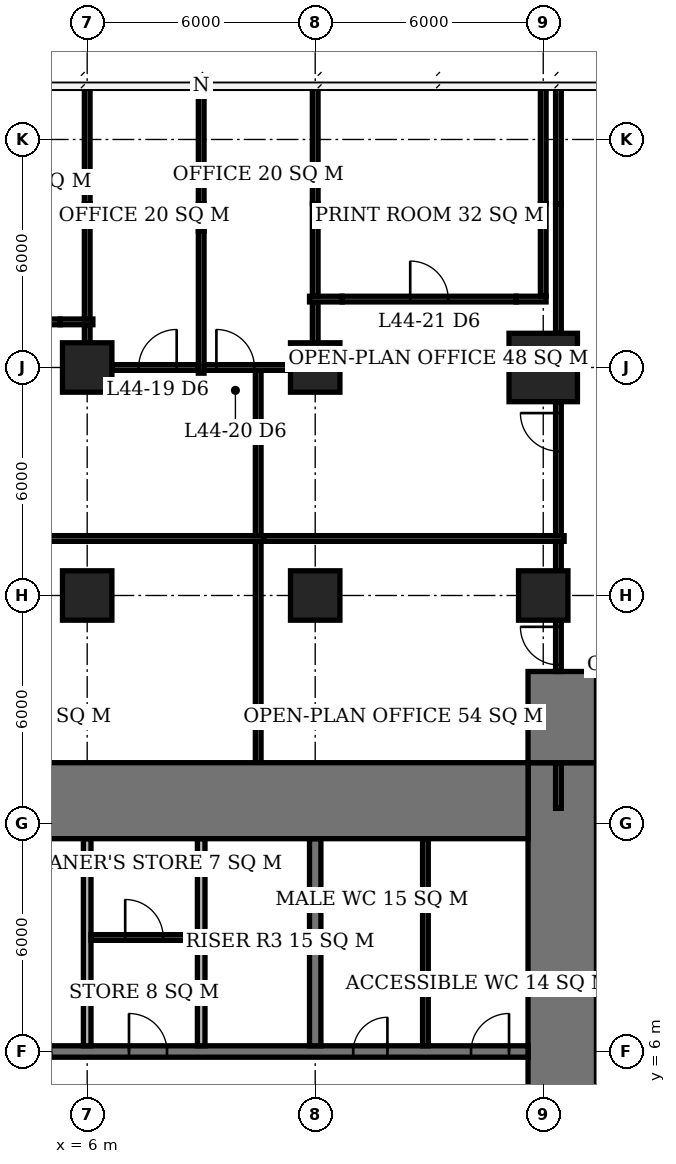
"""IFC4 building model, lengths in metres.
Left out: names, types, materials, properties, quantities, classifications, styles, units other than length and angle.
Written with IfcOpenShell. Run it as: python <this file> out.ifc"""

import sys

from ifc_helpers import new_model, si_unit, direction, frame, frame_2d, origin, origin_2d, place, context, subcontext, project, spatial, rectangle, extrude, element, fill, save


model = new_model("IFC4")
c1 = context("Model", 3, precision=1e-05, world=origin(), true_north=direction((0.0, 1.0)))
c2 = subcontext(c1, "Body", "Model", "MODEL_VIEW")
j1 = project(units=[si_unit("LENGTHUNIT", "METRE"), si_unit("PLANEANGLEUNIT", "RADIAN")], contexts=[c1])
p1 = place(None, origin())
s1 = spatial("IfcSite", under=j1, at=p1, CompositionType="ELEMENT")
p2 = place(p1, origin())
s2 = spatial("IfcBuilding", under=s1, at=p2, CompositionType="ELEMENT")
p3 = place(p2, frame((0.0, 0.0, 181.1)))
s3 = spatial("IfcBuildingStorey", under=s2, at=p3, CompositionType="ELEMENT", Elevation=181.1)
for number, where, z_axis, x_axis in (
    (1, (6.0, 18.0, 0.0), (0.0, 0.0, 1.0), (1.0, 0.0, 0.0)),
    (2, (6.0, 24.0, 0.0), (0.0, 0.0, 1.0), (1.0, 0.0, 0.0)),
    (3, (12.0, 18.0, 0.0), (0.0, 0.0, 1.0), (1.0, 0.0, 0.0)),
    (4, (12.0, 24.0, 0.0), (0.0, 0.0, 1.0), (1.0, 0.0, 0.0)),
    (5, (18.0, 18.0, 0.0), (0.0, 0.0, 1.0), (1.0, 0.0, 0.0)),
):
    element("IfcColumn", number, at=place(p3, frame(where, z_axis=z_axis, x_axis=x_axis)), inside=s3, PredefinedType="COLUMN", context=c2, shape_type="SweptSolid", body=[
        extrude(rectangle(XDim=1.3, YDim=1.3, at=origin_2d()), origin(), (0.0, 0.0, 1.0), 3.9),
    ])
p4 = place(p3, frame((18.0, 24.0, 0.0), z_axis=(0.0, 0.0, 1.0), x_axis=(1.0, 0.0, 0.0)))
e6 = element("IfcColumn", 6, at=p4, inside=s3, PredefinedType="COLUMN", context=c2, shape_type="SweptSolid", body=[
    extrude(rectangle(XDim=1.8, YDim=1.8, at=origin_2d()), origin(), (0.0, 0.0, 1.0), 3.9),
])
p5 = place(p3, frame((-5.6, 12.6, 0.0), z_axis=(0.0, 0.0, 1.0), x_axis=(1.0, 0.0, 0.0)))
e7 = element("IfcWall", 7, at=p5, inside=s3, PredefinedType="SHEAR", context=c2, shape_type="SweptSolid", body=[
    extrude(rectangle(XDim=23.2, YDim=2.0, at=frame_2d((11.6, 0.0))), origin(), (0.0, 0.0, 1.0), 3.9),
])
p6 = place(p3, frame((18.5, -7.6, 0.0), z_axis=(0.0, 0.0, 1.0), x_axis=(0.0, 1.0, 0.0)))
e8 = element("IfcWall", 8, at=p6, inside=s3, PredefinedType="SHEAR", context=c2, shape_type="SweptSolid", body=[
    extrude(rectangle(XDim=21.2, YDim=1.8, at=frame_2d((10.6, 0.0))), origin(), (0.0, 0.0, 1.0), 3.9),
])
p7 = place(p6, frame((9.2, 0.0, 0.0)))
e9 = element("IfcOpeningElement", 9, at=p7, cuts=e8, PredefinedType="OPENING", context=c2, shape_type="SweptSolid", body=[
    extrude(rectangle(XDim=1.8, YDim=2.4, at=frame_2d((0.9, 1.2))), frame((0.0, 0.91, 0.0), z_axis=(0.0, -1.0, 0.0), x_axis=(1.0, 0.0, 0.0)), (0.0, 0.0, 1.0), 1.82),
])
p8 = place(p3, frame((18.5, 13.6, 0.0), z_axis=(0.0, 0.0, 1.0), x_axis=(0.0, 1.0, 0.0)))
e10 = element("IfcWall", 10, at=p8, inside=s3, PredefinedType="SHEAR", context=c2, shape_type="SweptSolid", body=[
    extrude(rectangle(XDim=2.4, YDim=1.8, at=frame_2d((1.2, 0.0))), origin(), (0.0, 0.0, 1.0), 3.9),
])
p9 = place(p3, frame((-0.15, 6.0, 0.0), z_axis=(0.0, 0.0, 1.0), x_axis=(1.0, 0.0, 0.0)))
e11 = element("IfcWall", 11, at=p9, inside=s3, PredefinedType="SHEAR", context=c2, shape_type="SweptSolid", body=[
    extrude(rectangle(XDim=17.75, YDim=0.3, at=frame_2d((8.875, 0.0))), origin(), (0.0, 0.0, 1.0), 3.9),
])
p10 = place(p9, frame((13.15, 0.0, 0.0)))
e12 = element("IfcOpeningElement", 12, at=p10, cuts=e11, PredefinedType="OPENING", context=c2, shape_type="SweptSolid", body=[
    extrude(rectangle(XDim=0.9, YDim=2.1, at=frame_2d((0.45, 1.05))), frame((0.0, 0.16, 0.0), z_axis=(0.0, -1.0, 0.0), x_axis=(1.0, 0.0, 0.0)), (0.0, 0.0, 1.0), 0.32),
])
p11 = place(p9, frame((16.25, 0.0, 0.0)))
e13 = element("IfcOpeningElement", 13, at=p11, cuts=e11, PredefinedType="OPENING", context=c2, shape_type="SweptSolid", body=[
    extrude(rectangle(XDim=1.0, YDim=2.1, at=frame_2d((0.5, 1.05))), frame((0.0, 0.16, 0.0), z_axis=(0.0, -1.0, 0.0), x_axis=(1.0, 0.0, 0.0)), (0.0, 0.0, 1.0), 0.32),
])
p12 = place(p9, frame((7.25, 0.0, 0.0)))
e14 = element("IfcOpeningElement", 14, at=p12, cuts=e11, PredefinedType="OPENING", context=c2, shape_type="SweptSolid", body=[
    extrude(rectangle(XDim=1.0, YDim=2.1, at=frame_2d((0.5, 1.05))), frame((0.0, 0.16, 0.0), z_axis=(0.0, -1.0, 0.0), x_axis=(1.0, 0.0, 0.0)), (0.0, 0.0, 1.0), 0.32),
])
p13 = place(p9, frame((1.1, 0.0, 0.0)))
e15 = element("IfcOpeningElement", 15, at=p13, cuts=e11, PredefinedType="OPENING", context=c2, shape_type="SweptSolid", body=[
    extrude(rectangle(XDim=1.1, YDim=2.1, at=frame_2d((0.55, 1.05))), frame((0.0, 0.16, 0.0), z_axis=(0.0, -1.0, 0.0), x_axis=(1.0, 0.0, 0.0)), (0.0, 0.0, 1.0), 0.32),
])
p14 = place(p9, frame((4.1, 0.0, 0.0)))
e16 = element("IfcOpeningElement", 16, at=p14, cuts=e11, PredefinedType="OPENING", context=c2, shape_type="SweptSolid", body=[
    extrude(rectangle(XDim=1.1, YDim=2.1, at=frame_2d((0.55, 1.05))), frame((0.0, 0.16, 0.0), z_axis=(0.0, -1.0, 0.0), x_axis=(1.0, 0.0, 0.0)), (0.0, 0.0, 1.0), 0.32),
])
p15 = place(p3, frame((12.0, 6.15, 0.0), z_axis=(0.0, 0.0, 1.0), x_axis=(0.0, 1.0, 0.0)))
e17 = element("IfcWall", 17, at=p15, inside=s3, PredefinedType="SHEAR", context=c2, shape_type="SweptSolid", body=[
    extrude(rectangle(XDim=5.45, YDim=0.3, at=frame_2d((2.725, 0.0))), origin(), (0.0, 0.0, 1.0), 3.9),
])
for number, where, z_axis, x_axis in (
    (18, (6.0, 6.15, 0.0), (0.0, 0.0, 1.0), (0.0, 1.0, 0.0)),
    (19, (9.0, 6.15, 0.0), (0.0, 0.0, 1.0), (0.0, 1.0, 0.0)),
):
    element("IfcWall", number, at=place(p3, frame(where, z_axis=z_axis, x_axis=x_axis)), inside=s3, PredefinedType="SOLIDWALL", context=c2, shape_type="SweptSolid", body=[
        extrude(rectangle(XDim=5.45, YDim=0.2, at=frame_2d((2.725, 0.0))), origin(), (0.0, 0.0, 1.0), 3.9),
    ])
p16 = place(p3, frame((14.9, 6.15, 0.0), z_axis=(0.0, 0.0, 1.0), x_axis=(0.0, 1.0, 0.0)))
e20 = element("IfcWall", 20, at=p16, inside=s3, PredefinedType="PLUMBINGWALL", context=c2, shape_type="SweptSolid", body=[
    extrude(rectangle(XDim=5.45, YDim=0.15, at=frame_2d((2.725, 0.0))), origin(), (0.0, 0.0, 1.0), 3.65),
])
p17 = place(p3, frame((6.1, 9.0, 0.0), z_axis=(0.0, 0.0, 1.0), x_axis=(1.0, 0.0, 0.0)))
e21 = element("IfcWall", 21, at=p17, inside=s3, PredefinedType="PARTITIONING", context=c2, shape_type="SweptSolid", body=[
    extrude(rectangle(XDim=2.8, YDim=0.15, at=frame_2d((1.4, 0.0))), origin(), (0.0, 0.0, 1.0), 3.65),
])
p18 = place(p17, frame((0.9, 0.0, 0.0)))
e22 = element("IfcOpeningElement", 22, at=p18, cuts=e21, PredefinedType="OPENING", context=c2, shape_type="SweptSolid", body=[
    extrude(rectangle(XDim=1.0, YDim=2.1, at=frame_2d((0.5, 1.05))), frame((0.0, 0.085, 0.0), z_axis=(0.0, -1.0, 0.0), x_axis=(1.0, 0.0, 0.0)), (0.0, 0.0, 1.0), 0.17),
])
p19 = place(p3, frame((6.66, 24.0, 0.0), z_axis=(0.0, 0.0, 1.0), x_axis=(1.0, 0.0, 0.0)))
e23 = element("IfcWall", 23, at=p19, inside=s3, PredefinedType="PARTITIONING", context=c2, shape_type="SweptSolid", body=[
    extrude(rectangle(XDim=2.265, YDim=0.15, at=frame_2d((1.133, 0.0))), origin(), (0.0, 0.0, 1.0), 3.65),
])
p20 = place(p19, frame((0.695, 0.0, 0.0)))
e24 = element("IfcOpeningElement", 24, at=p20, cuts=e23, PredefinedType="OPENING", context=c2, shape_type="SweptSolid", body=[
    extrude(rectangle(XDim=1.0, YDim=2.1, at=frame_2d((0.5, 1.05))), frame((0.0, 0.085, 0.0), z_axis=(0.0, -1.0, 0.0), x_axis=(1.0, 0.0, 0.0)), (0.0, 0.0, 1.0), 0.17),
])
p21 = place(p3, frame((9.075, 24.0, 0.0), z_axis=(0.0, 0.0, 1.0), x_axis=(1.0, 0.0, 0.0)))
e25 = element("IfcWall", 25, at=p21, inside=s3, PredefinedType="PARTITIONING", context=c2, shape_type="SweptSolid", body=[
    extrude(rectangle(XDim=2.265, YDim=0.15, at=frame_2d((1.133, 0.0))), origin(), (0.0, 0.0, 1.0), 3.65),
])
p22 = place(p21, frame((0.325, 0.0, 0.0)))
e26 = element("IfcOpeningElement", 26, at=p22, cuts=e25, PredefinedType="OPENING", context=c2, shape_type="SweptSolid", body=[
    extrude(rectangle(XDim=1.0, YDim=2.1, at=frame_2d((0.5, 1.05))), frame((0.0, 0.085, 0.0), z_axis=(0.0, -1.0, 0.0), x_axis=(1.0, 0.0, 0.0)), (0.0, 0.0, 1.0), 0.17),
])
p23 = place(p3, frame((0.71, 25.2, 0.0), z_axis=(0.0, 0.0, 1.0), x_axis=(1.0, 0.0, 0.0)))
e27 = element("IfcWall", 27, at=p23, inside=s3, PredefinedType="PARTITIONING", context=c2, shape_type="SweptSolid", body=[
    extrude(rectangle(XDim=4.58, YDim=0.15, at=frame_2d((2.29, 0.0))), origin(), (0.0, 0.0, 1.0), 3.65),
])
p24 = place(p23, frame((1.79, 0.0, 0.0)))
e28 = element("IfcOpeningElement", 28, at=p24, cuts=e27, PredefinedType="OPENING", context=c2, shape_type="SweptSolid", body=[
    extrude(rectangle(XDim=1.0, YDim=2.1, at=frame_2d((0.5, 1.05))), frame((0.0, 0.085, 0.0), z_axis=(0.0, -1.0, 0.0), x_axis=(1.0, 0.0, 0.0)), (0.0, 0.0, 1.0), 0.17),
])
for number, where, z_axis, x_axis in (
    (29, (5.29, 25.2, 0.0), (0.0, 0.0, 1.0), (1.0, 0.0, 0.0)),
    (30, (11.85, 25.8, 0.0), (0.0, 0.0, 1.0), (1.0, 0.0, 0.0)),
):
    element("IfcWall", number, at=place(p3, frame(where, z_axis=z_axis, x_axis=x_axis)), inside=s3, PredefinedType="PARTITIONING", context=c2, shape_type="SweptSolid", body=[
        extrude(rectangle(XDim=0.86, YDim=0.15, at=frame_2d((0.43, 0.0))), origin(), (0.0, 0.0, 1.0), 2.65),
    ])
p25 = place(p3, frame((12.71, 25.8, 0.0), z_axis=(0.0, 0.0, 1.0), x_axis=(1.0, 0.0, 0.0)))
e31 = element("IfcWall", 31, at=p25, inside=s3, PredefinedType="PARTITIONING", context=c2, shape_type="SweptSolid", body=[
    extrude(rectangle(XDim=4.58, YDim=0.15, at=frame_2d((2.29, 0.0))), origin(), (0.0, 0.0, 1.0), 3.65),
])
p26 = place(p25, frame((1.79, 0.0, 0.0)))
e32 = element("IfcOpeningElement", 32, at=p26, cuts=e31, PredefinedType="OPENING", context=c2, shape_type="SweptSolid", body=[
    extrude(rectangle(XDim=1.0, YDim=2.1, at=frame_2d((0.5, 1.05))), frame((0.0, 0.085, 0.0), z_axis=(0.0, -1.0, 0.0), x_axis=(1.0, 0.0, 0.0)), (0.0, 0.0, 1.0), 0.17),
])
p27 = place(p3, frame((17.29, 25.8, 0.0), z_axis=(0.0, 0.0, 1.0), x_axis=(1.0, 0.0, 0.0)))
e33 = element("IfcWall", 33, at=p27, inside=s3, PredefinedType="PARTITIONING", context=c2, shape_type="SweptSolid", body=[
    extrude(rectangle(XDim=0.785, YDim=0.15, at=frame_2d((0.393, 0.0))), origin(), (0.0, 0.0, 1.0), 2.65),
])
p28 = place(p3, frame((6.0, 24.65, 0.0), z_axis=(0.0, 0.0, 1.0), x_axis=(0.0, 1.0, 0.0)))
e34 = element("IfcWall", 34, at=p28, inside=s3, PredefinedType="PARTITIONING", context=c2, shape_type="SweptSolid", body=[
    extrude(rectangle(XDim=0.475, YDim=0.15, at=frame_2d((0.238, 0.0))), origin(), (0.0, 0.0, 1.0), 2.65),
])
p29 = place(p3, frame((6.0, 25.275, 0.0), z_axis=(0.0, 0.0, 1.0), x_axis=(0.0, 1.0, 0.0)))
e35 = element("IfcWall", 35, at=p29, inside=s3, PredefinedType="PARTITIONING", context=c2, shape_type="SweptSolid", body=[
    extrude(rectangle(XDim=3.035, YDim=0.15, at=frame_2d((1.518, 0.0))), origin(), (0.0, 0.0, 1.0), 2.65),
])
p30 = place(p3, frame((6.0, 28.31, 0.0), z_axis=(0.0, 0.0, 1.0), x_axis=(0.0, 1.0, 0.0)))
e36 = element("IfcWall", 36, at=p30, inside=s3, PredefinedType="PARTITIONING", context=c2, shape_type="SweptSolid", body=[
    extrude(rectangle(XDim=3.04, YDim=0.15, at=frame_2d((1.52, 0.0))), origin(), (0.0, 0.0, 1.0), 3.65),
])
p31 = place(p3, frame((9.0, 23.85, 0.0), z_axis=(0.0, 0.0, 1.0), x_axis=(0.0, 1.0, 0.0)))
e37 = element("IfcWall", 37, at=p31, inside=s3, PredefinedType="PARTITIONING", context=c2, shape_type="SweptSolid", body=[
    extrude(rectangle(XDim=3.74, YDim=0.15, at=frame_2d((1.87, 0.0))), origin(), (0.0, 0.0, 1.0), 3.65),
])
p32 = place(p3, frame((9.0, 27.59, 0.0), z_axis=(0.0, 0.0, 1.0), x_axis=(0.0, 1.0, 0.0)))
e38 = element("IfcWall", 38, at=p32, inside=s3, PredefinedType="PARTITIONING", context=c2, shape_type="SweptSolid", body=[
    extrude(rectangle(XDim=0.72, YDim=0.15, at=frame_2d((0.36, 0.0))), origin(), (0.0, 0.0, 1.0), 2.65),
])
p33 = place(p3, frame((9.0, 28.31, 0.0), z_axis=(0.0, 0.0, 1.0), x_axis=(0.0, 1.0, 0.0)))
e39 = element("IfcWall", 39, at=p33, inside=s3, PredefinedType="PARTITIONING", context=c2, shape_type="SweptSolid", body=[
    extrude(rectangle(XDim=3.04, YDim=0.15, at=frame_2d((1.52, 0.0))), origin(), (0.0, 0.0, 1.0), 3.65),
])
p34 = place(p3, frame((12.0, 24.65, 0.0), z_axis=(0.0, 0.0, 1.0), x_axis=(0.0, 1.0, 0.0)))
e40 = element("IfcWall", 40, at=p34, inside=s3, PredefinedType="PARTITIONING", context=c2, shape_type="SweptSolid", body=[
    extrude(rectangle(XDim=1.075, YDim=0.15, at=frame_2d((0.538, 0.0))), origin(), (0.0, 0.0, 1.0), 2.65),
])
p35 = place(p3, frame((12.0, 25.875, 0.0), z_axis=(0.0, 0.0, 1.0), x_axis=(0.0, 1.0, 0.0)))
e41 = element("IfcWall", 41, at=p35, inside=s3, PredefinedType="PARTITIONING", context=c2, shape_type="SweptSolid", body=[
    extrude(rectangle(XDim=2.435, YDim=0.15, at=frame_2d((1.218, 0.0))), origin(), (0.0, 0.0, 1.0), 2.65),
])
p36 = place(p3, frame((12.0, 28.31, 0.0), z_axis=(0.0, 0.0, 1.0), x_axis=(0.0, 1.0, 0.0)))
e42 = element("IfcWall", 42, at=p36, inside=s3, PredefinedType="PARTITIONING", context=c2, shape_type="SweptSolid", body=[
    extrude(rectangle(XDim=3.04, YDim=0.15, at=frame_2d((1.52, 0.0))), origin(), (0.0, 0.0, 1.0), 3.65),
])
p37 = place(p3, frame((18.0, 25.875, 0.0), z_axis=(0.0, 0.0, 1.0), x_axis=(0.0, 1.0, 0.0)))
e43 = element("IfcWall", 43, at=p37, inside=s3, PredefinedType="PARTITIONING", context=c2, shape_type="SweptSolid", body=[
    extrude(rectangle(XDim=2.435, YDim=0.15, at=frame_2d((1.218, 0.0))), origin(), (0.0, 0.0, 1.0), 2.65),
])
p38 = place(p3, frame((18.0, 28.31, 0.0), z_axis=(0.0, 0.0, 1.0), x_axis=(0.0, 1.0, 0.0)))
e44 = element("IfcWall", 44, at=p38, inside=s3, PredefinedType="PARTITIONING", context=c2, shape_type="SweptSolid", body=[
    extrude(rectangle(XDim=3.09, YDim=0.15, at=frame_2d((1.545, 0.0))), origin(), (0.0, 0.0, 1.0), 3.65),
])
p39 = place(p3, frame((-6.325, 19.5, 0.0), z_axis=(0.0, 0.0, 1.0), x_axis=(1.0, 0.0, 0.0)))
e45 = element("IfcWall", 45, at=p39, inside=s3, PredefinedType="PARTITIONING", context=c2, shape_type="SweptSolid", body=[
    extrude(rectangle(XDim=16.975, YDim=0.15, at=frame_2d((8.487, 0.0))), origin(), (0.0, 0.0, 1.0), 3.65),
])
p40 = place(p3, frame((10.5, 12.4, 0.0), z_axis=(0.0, 0.0, 1.0), x_axis=(0.0, 1.0, 0.0)))
e46 = element("IfcWall", 46, at=p40, inside=s3, PredefinedType="PARTITIONING", context=c2, shape_type="SweptSolid", body=[
    extrude(rectangle(XDim=7.025, YDim=0.15, at=frame_2d((3.513, 0.0))), origin(), (0.0, 0.0, 1.0), 3.65),
])
p41 = place(p3, frame((10.5, 19.575, 0.0), z_axis=(0.0, 0.0, 1.0), x_axis=(0.0, 1.0, 0.0)))
e47 = element("IfcWall", 47, at=p41, inside=s3, PredefinedType="PARTITIONING", context=c2, shape_type="SweptSolid", body=[
    extrude(rectangle(XDim=4.35, YDim=0.15, at=frame_2d((2.175, 0.0))), origin(), (0.0, 0.0, 1.0), 3.65),
])
p42 = place(p3, frame((10.65, 19.5, 0.0), z_axis=(0.0, 0.0, 1.0), x_axis=(1.0, 0.0, 0.0)))
e48 = element("IfcWall", 48, at=p42, inside=s3, PredefinedType="PARTITIONING", context=c2, shape_type="SweptSolid", body=[
    extrude(rectangle(XDim=7.9, YDim=0.15, at=frame_2d((3.95, 0.0))), origin(), (0.0, 0.0, 1.0), 3.65),
])
p43 = place(p3, frame((18.4, 12.4, 0.0), z_axis=(0.0, 0.0, 1.0), x_axis=(0.0, 1.0, 0.0)))
e49 = element("IfcWall", 49, at=p43, inside=s3, PredefinedType="PARTITIONING", context=c2, shape_type="SweptSolid", body=[
    extrude(rectangle(XDim=1.2, YDim=0.15, at=frame_2d((0.6, 0.0))), origin(), (0.0, 0.0, 1.0), 3.65),
])
p44 = place(p3, frame((18.4, 16.0, 0.0), z_axis=(0.0, 0.0, 1.0), x_axis=(0.0, 1.0, 0.0)))
e50 = element("IfcWall", 50, at=p44, inside=s3, PredefinedType="PARTITIONING", context=c2, shape_type="SweptSolid", body=[
    extrude(rectangle(XDim=1.35, YDim=0.15, at=frame_2d((0.675, 0.0))), origin(), (0.0, 0.0, 1.0), 3.65),
])
p45 = place(p44, frame((0.175, 0.0, 0.0)))
e51 = element("IfcOpeningElement", 51, at=p45, cuts=e50, PredefinedType="OPENING", context=c2, shape_type="SweptSolid", body=[
    extrude(rectangle(XDim=1.0, YDim=2.1, at=frame_2d((0.5, 1.05))), frame((0.0, 0.085, 0.0), z_axis=(0.0, -1.0, 0.0), x_axis=(1.0, 0.0, 0.0)), (0.0, 0.0, 1.0), 0.17),
])
p46 = place(p3, frame((18.4, 18.65, 0.0), z_axis=(0.0, 0.0, 1.0), x_axis=(0.0, 1.0, 0.0)))
e52 = element("IfcWall", 52, at=p46, inside=s3, PredefinedType="PARTITIONING", context=c2, shape_type="SweptSolid", body=[
    extrude(rectangle(XDim=0.775, YDim=0.15, at=frame_2d((0.388, 0.0))), origin(), (0.0, 0.0, 1.0), 3.65),
])
p47 = place(p3, frame((18.4, 19.575, 0.0), z_axis=(0.0, 0.0, 1.0), x_axis=(0.0, 1.0, 0.0)))
e53 = element("IfcWall", 53, at=p47, inside=s3, PredefinedType="PARTITIONING", context=c2, shape_type="SweptSolid", body=[
    extrude(rectangle(XDim=3.525, YDim=0.15, at=frame_2d((1.763, 0.0))), origin(), (0.0, 0.0, 1.0), 3.65),
])
p48 = place(p47, frame((2.225, 0.0, 0.0)))
e54 = element("IfcOpeningElement", 54, at=p48, cuts=e53, PredefinedType="OPENING", context=c2, shape_type="SweptSolid", body=[
    extrude(rectangle(XDim=1.0, YDim=2.1, at=frame_2d((0.5, 1.05))), frame((0.0, 0.085, 0.0), z_axis=(0.0, -1.0, 0.0), x_axis=(1.0, 0.0, 0.0)), (0.0, 0.0, 1.0), 0.17),
])
p49 = place(p3, frame((18.4, 24.9, 0.0), z_axis=(0.0, 0.0, 1.0), x_axis=(0.0, 1.0, 0.0)))
e55 = element("IfcWall", 55, at=p49, inside=s3, PredefinedType="PARTITIONING", context=c2, shape_type="SweptSolid", body=[
    extrude(rectangle(XDim=3.41, YDim=0.15, at=frame_2d((1.705, 0.0))), origin(), (0.0, 0.0, 1.0), 2.65),
])
p50 = place(p3, frame((18.4, 28.31, 0.0), z_axis=(0.0, 0.0, 1.0), x_axis=(0.0, 1.0, 0.0)))
e56 = element("IfcWall", 56, at=p50, inside=s3, PredefinedType="PARTITIONING", context=c2, shape_type="SweptSolid", body=[
    extrude(rectangle(XDim=3.04, YDim=0.15, at=frame_2d((1.52, 0.0))), origin(), (0.0, 0.0, 1.0), 3.65),
])
p51 = place(p10, origin())
e57 = element("IfcDoor", 57, at=p51, inside=s3, OperationType="SINGLE_SWING_RIGHT", PredefinedType="DOOR", context=c2, shape_type="SweptSolid", body=[
    extrude(rectangle(XDim=0.9, YDim=2.1, at=frame_2d((0.45, 1.05))), frame((0.0, 0.025, 0.0), z_axis=(0.0, -1.0, 0.0), x_axis=(1.0, 0.0, 0.0)), (0.0, 0.0, 1.0), 0.05),
])
fill(e12, e57)
p52 = place(p11, origin())
e58 = element("IfcDoor", 58, at=p52, inside=s3, OperationType="SINGLE_SWING_RIGHT", PredefinedType="DOOR", context=c2, shape_type="SweptSolid", body=[
    extrude(rectangle(XDim=1.0, YDim=2.1, at=frame_2d((0.5, 1.05))), frame((0.0, 0.025, 0.0), z_axis=(0.0, -1.0, 0.0), x_axis=(1.0, 0.0, 0.0)), (0.0, 0.0, 1.0), 0.05),
])
fill(e13, e58)
p53 = place(p18, origin())
e59 = element("IfcDoor", 59, at=p53, inside=s3, OperationType="SINGLE_SWING_LEFT", PredefinedType="DOOR", context=c2, shape_type="SweptSolid", body=[
    extrude(rectangle(XDim=1.0, YDim=2.1, at=frame_2d((0.5, 1.05))), frame((0.0, 0.025, 0.0), z_axis=(0.0, -1.0, 0.0), x_axis=(1.0, 0.0, 0.0)), (0.0, 0.0, 1.0), 0.05),
])
fill(e22, e59)
p54 = place(p12, origin())
e60 = element("IfcDoor", 60, at=p54, inside=s3, OperationType="SINGLE_SWING_LEFT", PredefinedType="DOOR", context=c2, shape_type="SweptSolid", body=[
    extrude(rectangle(XDim=1.0, YDim=2.1, at=frame_2d((0.5, 1.05))), frame((0.0, 0.025, 0.0), z_axis=(0.0, -1.0, 0.0), x_axis=(1.0, 0.0, 0.0)), (0.0, 0.0, 1.0), 0.05),
])
fill(e14, e60)
p55 = place(p20, origin())
e61 = element("IfcDoor", 61, at=p55, inside=s3, OperationType="SINGLE_SWING_RIGHT", PredefinedType="DOOR", context=c2, shape_type="SweptSolid", body=[
    extrude(rectangle(XDim=1.0, YDim=2.1, at=frame_2d((0.5, 1.05))), frame((0.0, 0.025, 0.0), z_axis=(0.0, -1.0, 0.0), x_axis=(1.0, 0.0, 0.0)), (0.0, 0.0, 1.0), 0.05),
])
fill(e24, e61)
p56 = place(p22, origin())
e62 = element("IfcDoor", 62, at=p56, inside=s3, OperationType="SINGLE_SWING_LEFT", PredefinedType="DOOR", context=c2, shape_type="SweptSolid", body=[
    extrude(rectangle(XDim=1.0, YDim=2.1, at=frame_2d((0.5, 1.05))), frame((0.0, 0.025, 0.0), z_axis=(0.0, -1.0, 0.0), x_axis=(1.0, 0.0, 0.0)), (0.0, 0.0, 1.0), 0.05),
])
fill(e26, e62)
p57 = place(p26, origin())
e63 = element("IfcDoor", 63, at=p57, inside=s3, OperationType="SINGLE_SWING_LEFT", PredefinedType="DOOR", context=c2, shape_type="SweptSolid", body=[
    extrude(rectangle(XDim=1.0, YDim=2.1, at=frame_2d((0.5, 1.05))), frame((0.0, 0.025, 0.0), z_axis=(0.0, -1.0, 0.0), x_axis=(1.0, 0.0, 0.0)), (0.0, 0.0, 1.0), 0.05),
])
fill(e32, e63)
p58 = place(p48, origin())
e64 = element("IfcDoor", 64, at=p58, inside=s3, OperationType="SINGLE_SWING_RIGHT", PredefinedType="DOOR", context=c2, shape_type="SweptSolid", body=[
    extrude(rectangle(XDim=1.0, YDim=2.1, at=frame_2d((0.5, 1.05))), frame((0.0, 0.025, 0.0), z_axis=(0.0, -1.0, 0.0), x_axis=(1.0, 0.0, 0.0)), (0.0, 0.0, 1.0), 0.05),
])
fill(e54, e64)
p59 = place(p45, origin())
e65 = element("IfcDoor", 65, at=p59, inside=s3, OperationType="SINGLE_SWING_RIGHT", PredefinedType="DOOR", context=c2, shape_type="SweptSolid", body=[
    extrude(rectangle(XDim=1.0, YDim=2.1, at=frame_2d((0.5, 1.05))), frame((0.0, 0.025, 0.0), z_axis=(0.0, -1.0, 0.0), x_axis=(1.0, 0.0, 0.0)), (0.0, 0.0, 1.0), 0.05),
])
fill(e51, e65)
save(model, sys.argv[1])
